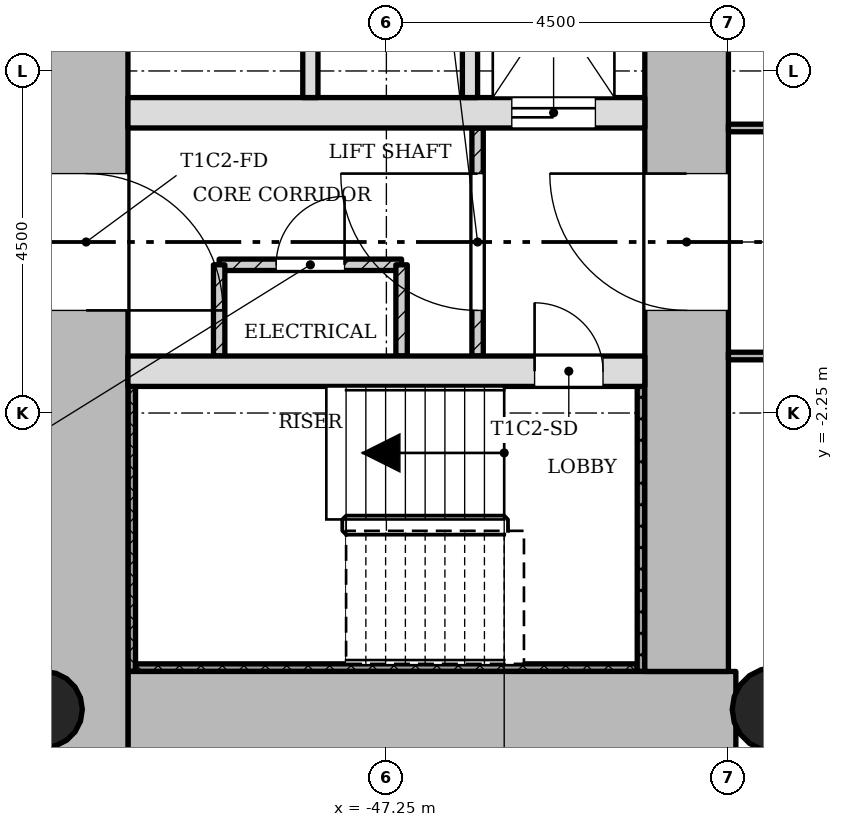
"""IFC4 building model, lengths in metres.
Left out: names, types, materials, properties, quantities, classifications, styles, units other than length and angle.
Written with IfcOpenShell. Run it as: python <this file> out.ifc"""

import sys

from ifc_helpers import new_model, si_unit, direction, frame, frame_2d, origin, origin_2d, place, context, subcontext, project, spatial, rectangle, hollow_circle, extrude, element, fill, save


model = new_model("IFC4")
c1 = context("Model", 3, precision=1e-05, world=origin(), true_north=direction((0.0, 1.0)))
c2 = subcontext(c1, "Body", "Model", "MODEL_VIEW")
j1 = project(units=[si_unit("LENGTHUNIT", "METRE"), si_unit("PLANEANGLEUNIT", "RADIAN")], contexts=[c1])
p1 = place(None, origin())
s1 = spatial("IfcSite", under=j1, at=p1, CompositionType="ELEMENT")
p2 = place(p1, origin())
s2 = spatial("IfcBuilding", under=s1, at=p2, CompositionType="ELEMENT")
p3 = place(p2, frame((0.0, 0.0, 51.7)))
s3 = spatial("IfcBuildingStorey", under=s2, at=p3, CompositionType="ELEMENT", Elevation=51.7)
p4 = place(p3, frame((-50.65, -6.2, 0.0), z_axis=(0.0, 0.0, 1.0), x_axis=(1.0, 0.0, 0.0)))
e1 = element("IfcWall", 1, at=p4, inside=s3, PredefinedType="SHEAR", context=c2, shape_type="SweptSolid", body=[
    extrude(rectangle(XDim=7.998, YDim=1.1, at=frame_2d((3.999, 0.0))), origin(), (0.0, 0.0, 1.0), 3.4),
])
p5 = place(p3, frame((-43.3, -5.65, 0.0), z_axis=(0.0, 0.0, 1.0), x_axis=(0.0, 1.0, 0.0)))
e2 = element("IfcWall", 2, at=p5, inside=s3, PredefinedType="SHEAR", context=c2, shape_type="SweptSolid", body=[
    extrude(rectangle(XDim=12.4, YDim=1.1, at=frame_2d((6.2, 0.0))), origin(), (0.0, 0.0, 1.0), 3.4),
])
p6 = place(p5, frame((4.75, 0.0, 0.0)))
e3 = element("IfcOpeningElement", 3, at=p6, cuts=e2, PredefinedType="OPENING", context=c2, shape_type="SweptSolid", body=[
    extrude(rectangle(XDim=1.8, YDim=2.1, at=frame_2d((0.9, 1.05))), frame((0.0, 0.56, 0.0), z_axis=(0.0, -1.0, 0.0), x_axis=(1.0, 0.0, 0.0)), (0.0, 0.0, 1.0), 1.12),
])
p7 = place(p3, frame((-51.2, 5.65, 0.0), z_axis=(0.0, 0.0, 1.0), x_axis=(0.0, -1.0, 0.0)))
e4 = element("IfcWall", 4, at=p7, inside=s3, PredefinedType="SHEAR", context=c2, shape_type="SweptSolid", body=[
    extrude(rectangle(XDim=12.4, YDim=1.1, at=frame_2d((6.2, 0.0))), origin(), (0.0, 0.0, 1.0), 3.4),
])
p8 = place(p7, frame((4.75, 0.0, 0.0)))
e5 = element("IfcOpeningElement", 5, at=p8, cuts=e4, PredefinedType="OPENING", context=c2, shape_type="SweptSolid", body=[
    extrude(rectangle(XDim=1.8, YDim=2.1, at=frame_2d((0.9, 1.05))), frame((0.0, 0.56, 0.0), z_axis=(0.0, -1.0, 0.0), x_axis=(1.0, 0.0, 0.0)), (0.0, 0.0, 1.0), 1.12),
])
p9 = place(p3, frame((-50.65, -1.7, 0.0), z_axis=(0.0, 0.0, 1.0), x_axis=(1.0, 0.0, 0.0)))
e6 = element("IfcWall", 6, at=p9, inside=s3, PredefinedType="SHEAR", context=c2, shape_type="SweptSolid", body=[
    extrude(rectangle(XDim=6.8, YDim=0.4, at=frame_2d((3.4, 0.0))), origin(), (0.0, 0.0, 1.0), 3.4),
])
p10 = place(p9, frame((5.35, 0.0, 0.0)))
e7 = element("IfcOpeningElement", 7, at=p10, cuts=e6, PredefinedType="OPENING", context=c2, shape_type="SweptSolid", body=[
    extrude(rectangle(XDim=0.9, YDim=2.1, at=frame_2d((0.45, 1.05))), frame((0.0, 0.21, 0.0), z_axis=(0.0, -1.0, 0.0), x_axis=(1.0, 0.0, 0.0)), (0.0, 0.0, 1.0), 0.42),
])
p11 = place(p3, frame((-50.65, 1.7, 0.0), z_axis=(0.0, 0.0, 1.0), x_axis=(1.0, 0.0, 0.0)))
e8 = element("IfcWall", 8, at=p11, inside=s3, PredefinedType="SHEAR", context=c2, shape_type="SweptSolid", body=[
    extrude(rectangle(XDim=6.8, YDim=0.4, at=frame_2d((3.4, 0.0))), origin(), (0.0, 0.0, 1.0), 3.4),
])
p12 = place(p11, frame((5.05, 0.0, 0.0)))
e9 = element("IfcOpeningElement", 9, at=p12, cuts=e8, PredefinedType="OPENING", context=c2, shape_type="SweptSolid", body=[
    extrude(rectangle(XDim=1.1, YDim=2.1, at=frame_2d((0.55, 1.05))), frame((0.0, 0.21, 0.0), z_axis=(0.0, -1.0, 0.0), x_axis=(1.0, 0.0, 0.0)), (0.0, 0.0, 1.0), 0.42),
])
p13 = place(p3, frame((-51.75, -6.15, 0.0), z_axis=(0.0, 0.0, 1.0), x_axis=(1.0, 0.0, 0.0)))
e10 = element("IfcColumn", 10, at=p13, inside=s3, PredefinedType="COLUMN", context=c2, shape_type="SweptSolid", body=[
    extrude(hollow_circle(Radius=0.5, WallThickness=0.036, at=origin_2d()), origin(), (0.0, 0.0, 1.0), 3.4),
])
p14 = place(p3, frame((-42.15, -6.15, 0.0), z_axis=(0.0, 0.0, 1.0), x_axis=(1.0, 0.0, 0.0)))
e11 = element("IfcColumn", 11, at=p14, inside=s3, PredefinedType="COLUMN", context=c2, shape_type="SweptSolid", body=[
    extrude(hollow_circle(Radius=0.55, WallThickness=0.04, at=origin_2d()), origin(), (0.0, 0.0, 1.0), 3.4),
])
p15 = place(p3, frame((-46.05, 1.5, 0.0), z_axis=(0.0, 0.0, 1.0), x_axis=(0.0, -1.0, 0.0)))
e12 = element("IfcWall", 12, at=p15, inside=s3, PredefinedType="PARTITIONING", context=c2, shape_type="SweptSolid", body=[
    extrude(rectangle(XDim=3.0, YDim=0.15, at=frame_2d((1.5, 0.0))), origin(), (0.0, 0.0, 1.0), 3.0),
])
p16 = place(p15, frame((0.6, 0.0, 0.0)))
e13 = element("IfcOpeningElement", 13, at=p16, cuts=e12, PredefinedType="OPENING", context=c2, shape_type="SweptSolid", body=[
    extrude(rectangle(XDim=1.8, YDim=2.1, at=frame_2d((0.9, 1.05))), frame((0.0, 0.085, 0.0), z_axis=(0.0, -1.0, 0.0), x_axis=(1.0, 0.0, 0.0)), (0.0, 0.0, 1.0), 0.17),
])
for number, where, z_axis, x_axis in (
    (14, (-46.15, 5.65, 0.0), (0.0, 0.0, 1.0), (0.0, -1.0, 0.0)),
    (15, (-48.25, 5.65, 0.0), (0.0, 0.0, 1.0), (0.0, -1.0, 0.0)),
):
    element("IfcWall", number, at=place(p3, frame(where, z_axis=z_axis, x_axis=x_axis)), inside=s3, PredefinedType="SOLIDWALL", context=c2, shape_type="SweptSolid", body=[
        extrude(rectangle(XDim=3.75, YDim=0.2, at=frame_2d((1.875, 0.0))), origin(), (0.0, 0.0, 1.0), 3.0),
    ])
p17 = place(p3, frame((-47.05, -0.3, 0.0), z_axis=(0.0, 0.0, 1.0), x_axis=(-1.0, 0.0, 0.0)))
e16 = element("IfcWall", 16, at=p17, inside=s3, PredefinedType="PARTITIONING", context=c2, shape_type="SweptSolid", body=[
    extrude(rectangle(XDim=2.4, YDim=0.15, at=frame_2d((1.2, 0.0))), origin(), (0.0, 0.0, 1.0), 3.0),
])
p18 = place(p17, frame((0.75, 0.0, 0.0)))
e17 = element("IfcOpeningElement", 17, at=p18, cuts=e16, PredefinedType="OPENING", context=c2, shape_type="SweptSolid", body=[
    extrude(rectangle(XDim=0.9, YDim=2.1, at=frame_2d((0.45, 1.05))), frame((0.0, 0.085, 0.0), z_axis=(0.0, -1.0, 0.0), x_axis=(1.0, 0.0, 0.0)), (0.0, 0.0, 1.0), 0.17),
])
for number, where, z_axis, x_axis in (
    (18, (-47.05, -0.3, 0.0), (0.0, 0.0, 1.0), (0.0, -1.0, 0.0)),
    (19, (-49.45, -0.3, 0.0), (0.0, 0.0, 1.0), (0.0, -1.0, 0.0)),
):
    element("IfcWall", number, at=place(p3, frame(where, z_axis=z_axis, x_axis=x_axis)), inside=s3, PredefinedType="PARTITIONING", context=c2, shape_type="SweptSolid", body=[
        extrude(rectangle(XDim=1.2, YDim=0.15, at=frame_2d((0.6, 0.0))), origin(), (0.0, 0.0, 1.0), 3.0),
    ])
p19 = place(p3, frame((-42.75, -1.5, 0.0), z_axis=(0.0, 0.0, 1.0), x_axis=(1.0, 0.0, 0.0)))
e20 = element("IfcWall", 20, at=p19, inside=s3, PredefinedType="PARTITIONING", context=c2, shape_type="SweptSolid", body=[
    extrude(rectangle(XDim=5.85, YDim=0.1, at=frame_2d((2.925, 0.0))), origin(), (0.0, 0.0, 1.0), 3.0),
])
p20 = place(p19, frame((2.475, 0.0, 0.0)))
e21 = element("IfcOpeningElement", 21, at=p20, cuts=e20, PredefinedType="OPENING", context=c2, shape_type="SweptSolid", body=[
    extrude(rectangle(XDim=0.9, YDim=2.1, at=frame_2d((0.45, 1.05))), frame((0.0, 0.06, 0.0), z_axis=(0.0, -1.0, 0.0), x_axis=(1.0, 0.0, 0.0)), (0.0, 0.0, 1.0), 0.12),
])
p21 = place(p3, frame((-42.75, 1.5, 0.0), z_axis=(0.0, 0.0, 1.0), x_axis=(1.0, 0.0, 0.0)))
e22 = element("IfcWall", 22, at=p21, inside=s3, PredefinedType="PARTITIONING", context=c2, shape_type="SweptSolid", body=[
    extrude(rectangle(XDim=5.85, YDim=0.1, at=frame_2d((2.925, 0.0))), origin(), (0.0, 0.0, 1.0), 3.0),
])
p22 = place(p21, frame((2.475, 0.0, 0.0)))
e23 = element("IfcOpeningElement", 23, at=p22, cuts=e22, PredefinedType="OPENING", context=c2, shape_type="SweptSolid", body=[
    extrude(rectangle(XDim=0.9, YDim=2.1, at=frame_2d((0.45, 1.05))), frame((0.0, 0.06, 0.0), z_axis=(0.0, -1.0, 0.0), x_axis=(1.0, 0.0, 0.0)), (0.0, 0.0, 1.0), 0.12),
])
p23 = place(p3, frame((-50.6, -1.9, 0.0), z_axis=(0.0, 0.0, 1.0), x_axis=(0.0, -1.0, 0.0)))
e24 = element("IfcWall", 24, at=p23, inside=s3, PredefinedType="SHEAR", context=c2, shape_type="SweptSolid", body=[
    extrude(rectangle(XDim=3.75, YDim=0.1, at=frame_2d((1.875, 0.0))), origin(), (0.0, 0.0, 1.0), 3.4),
])
p24 = place(p3, frame((-43.95, -5.6, 0.0), z_axis=(0.0, 0.0, 1.0), x_axis=(-1.0, 0.0, 0.0)))
e25 = element("IfcWall", 25, at=p24, inside=s3, PredefinedType="SHEAR", context=c2, shape_type="SweptSolid", body=[
    extrude(rectangle(XDim=6.6, YDim=0.1, at=frame_2d((3.3, 0.0))), origin(), (0.0, 0.0, 1.0), 3.4),
])
p25 = place(p3, frame((-43.9, -1.9, 0.0), z_axis=(0.0, 0.0, 1.0), x_axis=(0.0, -1.0, 0.0)))
e26 = element("IfcWall", 26, at=p25, inside=s3, PredefinedType="SHEAR", context=c2, shape_type="SweptSolid", body=[
    extrude(rectangle(XDim=3.75, YDim=0.1, at=frame_2d((1.875, 0.0))), origin(), (0.0, 0.0, 1.0), 3.4),
])
p26 = place(p16, origin())
e27 = element("IfcDoor", 27, at=p26, inside=s3, OperationType="SINGLE_SWING_LEFT", PredefinedType="DOOR", context=c2, shape_type="SweptSolid", body=[
    extrude(rectangle(XDim=1.8, YDim=2.1, at=frame_2d((0.9, 1.05))), frame((0.0, 0.025, 0.0), z_axis=(0.0, -1.0, 0.0), x_axis=(1.0, 0.0, 0.0)), (0.0, 0.0, 1.0), 0.05),
])
fill(e13, e27)
p27 = place(p18, origin())
e28 = element("IfcDoor", 28, at=p27, inside=s3, OperationType="SINGLE_SWING_LEFT", PredefinedType="DOOR", context=c2, shape_type="SweptSolid", body=[
    extrude(rectangle(XDim=0.9, YDim=2.1, at=frame_2d((0.45, 1.05))), frame((0.0, 0.025, 0.0), z_axis=(0.0, -1.0, 0.0), x_axis=(1.0, 0.0, 0.0)), (0.0, 0.0, 1.0), 0.05),
])
fill(e17, e28)
p28 = place(p10, origin())
e29 = element("IfcDoor", 29, at=p28, inside=s3, OperationType="SINGLE_SWING_RIGHT", PredefinedType="DOOR", context=c2, shape_type="SweptSolid", body=[
    extrude(rectangle(XDim=0.9, YDim=2.1, at=frame_2d((0.45, 1.05))), frame((0.0, 0.025, 0.0), z_axis=(0.0, -1.0, 0.0), x_axis=(1.0, 0.0, 0.0)), (0.0, 0.0, 1.0), 0.05),
])
fill(e7, e29)
p29 = place(p12, origin())
e30 = element("IfcDoor", 30, at=p29, inside=s3, OperationType="SLIDING_TO_LEFT", PredefinedType="DOOR", context=c2, shape_type="SweptSolid", body=[
    extrude(rectangle(XDim=1.1, YDim=2.1, at=frame_2d((0.55, 1.05))), frame((0.0, 0.025, 0.0), z_axis=(0.0, -1.0, 0.0), x_axis=(1.0, 0.0, 0.0)), (0.0, 0.0, 1.0), 0.05),
])
fill(e9, e30)
p30 = place(p6, origin())
e31 = element("IfcDoor", 31, at=p30, inside=s3, OperationType="SINGLE_SWING_LEFT", PredefinedType="DOOR", context=c2, shape_type="SweptSolid", body=[
    extrude(rectangle(XDim=1.8, YDim=2.1, at=frame_2d((0.9, 1.05))), frame((0.0, 0.025, 0.0), z_axis=(0.0, -1.0, 0.0), x_axis=(1.0, 0.0, 0.0)), (0.0, 0.0, 1.0), 0.05),
])
fill(e3, e31)
p31 = place(p8, origin())
e32 = element("IfcDoor", 32, at=p31, inside=s3, OperationType="SINGLE_SWING_LEFT", PredefinedType="DOOR", context=c2, shape_type="SweptSolid", body=[
    extrude(rectangle(XDim=1.8, YDim=2.1, at=frame_2d((0.9, 1.05))), frame((0.0, 0.025, 0.0), z_axis=(0.0, -1.0, 0.0), x_axis=(1.0, 0.0, 0.0)), (0.0, 0.0, 1.0), 0.05),
])
fill(e5, e32)
save(model, sys.argv[1])
